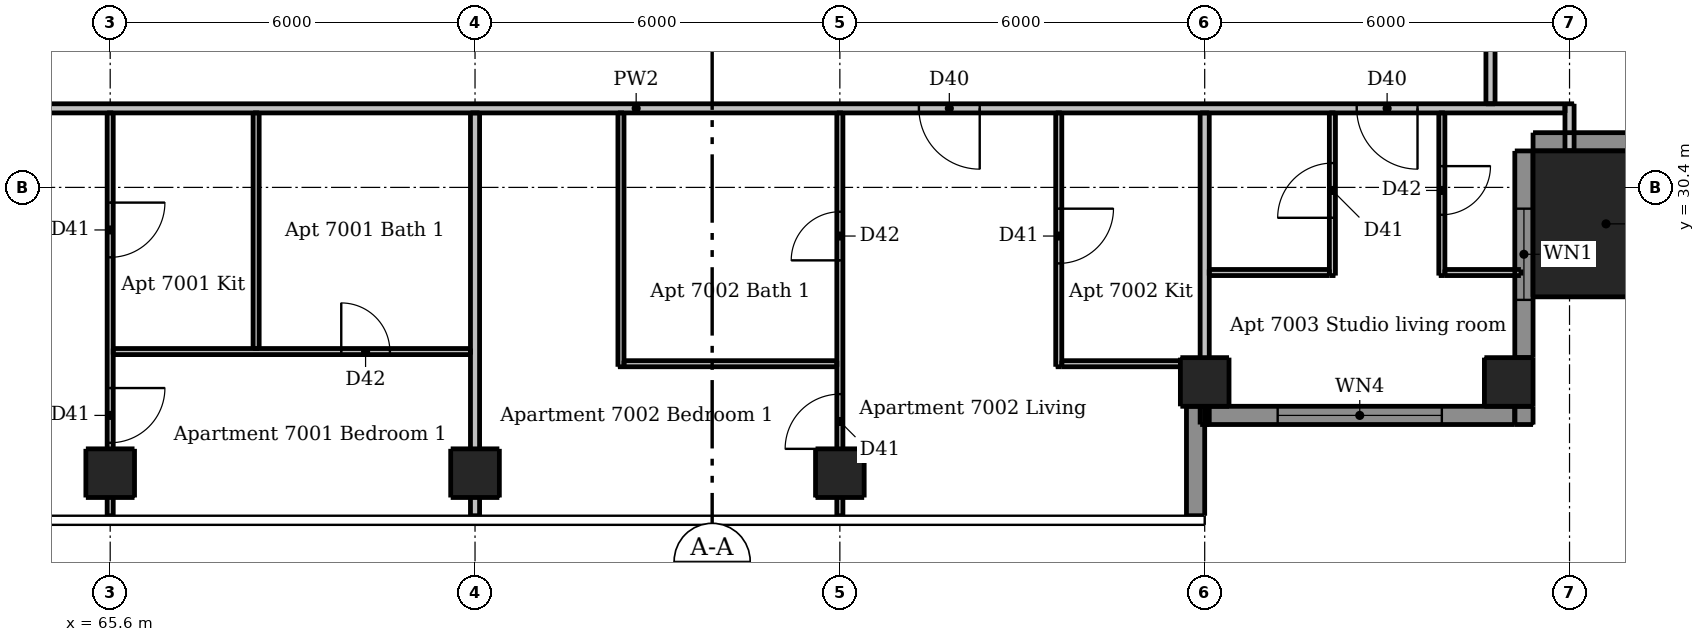
"""IFC4 building model, lengths in metres.
Left out: names, types, materials, properties, quantities, classifications, styles, units other than length and angle.
Written with IfcOpenShell. Run it as: python <this file> out.ifc"""

import sys

from ifc_helpers import new_model, si_unit, direction, frame, frame_2d, origin, origin_2d, place, context, subcontext, project, spatial, rectangle, extrude, element, fill, save


model = new_model("IFC4")
c1 = context("Model", 3, precision=1e-05, world=origin(), true_north=direction((0.0, 1.0)))
c2 = subcontext(c1, "Body", "Model", "MODEL_VIEW")
j1 = project(units=[si_unit("LENGTHUNIT", "METRE"), si_unit("PLANEANGLEUNIT", "RADIAN")], contexts=[c1])
p1 = place(None, origin())
s1 = spatial("IfcSite", under=j1, at=p1, CompositionType="ELEMENT")
p2 = place(p1, origin())
s2 = spatial("IfcBuilding", under=s1, at=p2, CompositionType="ELEMENT")
p3 = place(p2, frame((0.0, 0.0, 262.0)))
s3 = spatial("IfcBuildingStorey", under=s2, at=p3, CompositionType="ELEMENT", Elevation=262.0)
for number, where, z_axis, x_axis in (
    (1, (65.6, 25.7, 0.0), (0.0, 0.0, 1.0), (1.0, 0.0, 0.0)),
    (2, (71.6, 25.7, 0.0), (0.0, 0.0, 1.0), (1.0, 0.0, 0.0)),
    (3, (77.6, 25.7, 0.0), (0.0, 0.0, 1.0), (1.0, 0.0, 0.0)),
    (4, (83.6, 27.2, 0.0), (0.0, 0.0, 1.0), (1.0, 0.0, 0.0)),
    (5, (88.6, 27.2, 0.0), (0.0, 0.0, 1.0), (1.0, 0.0, 0.0)),
):
    element("IfcColumn", number, at=place(p3, frame(where, z_axis=z_axis, x_axis=x_axis)), inside=s3, PredefinedType="COLUMN", context=c2, shape_type="SweptSolid", body=[
        extrude(rectangle(XDim=0.8, YDim=0.8, at=origin_2d()), origin(), (0.0, 0.0, 1.0), 3.05),
    ])
p4 = place(p3, frame((90.2, 29.8, 0.0), z_axis=(0.0, 0.0, 1.0), x_axis=(1.0, 0.0, 0.0)))
e6 = element("IfcColumn", 6, at=p4, inside=s3, PredefinedType="COLUMN", context=c2, shape_type="SweptSolid", body=[
    extrude(rectangle(XDim=2.4, YDim=2.4, at=origin_2d()), origin(), (0.0, 0.0, 1.0), 3.3),
])
p5 = place(p3, frame((83.45, 25.0, 0.0), z_axis=(0.0, 0.0, 1.0), x_axis=(0.0, 1.0, 0.0)))
e7 = element("IfcWall", 7, at=p5, inside=s3, PredefinedType="SOLIDWALL", context=c2, shape_type="SweptSolid", body=[
    extrude(rectangle(XDim=1.8, YDim=0.3, at=frame_2d((0.9, 0.0))), origin(), (0.0, 0.0, 1.0), 3.05),
])
p6 = place(p3, frame((88.85, 26.5, 0.0), z_axis=(0.0, 0.0, 1.0), x_axis=(0.0, 1.0, 0.0)))
e8 = element("IfcWall", 8, at=p6, inside=s3, PredefinedType="SOLIDWALL", context=c2, shape_type="SweptSolid", body=[
    extrude(rectangle(XDim=0.3, YDim=0.3, at=frame_2d((0.15, 0.0))), origin(), (0.0, 0.0, 1.0), 3.05),
])
p7 = place(p3, frame((88.85, 27.6, 0.0), z_axis=(0.0, 0.0, 1.0), x_axis=(0.0, 1.0, 0.0)))
e9 = element("IfcWall", 9, at=p7, inside=s3, PredefinedType="SOLIDWALL", context=c2, shape_type="SweptSolid", body=[
    extrude(rectangle(XDim=3.4, YDim=0.3, at=frame_2d((1.7, 0.0))), origin(), (0.0, 0.0, 1.0), 3.05),
])
p8 = place(p7, frame((0.95, 0.0, 0.9)))
e10 = element("IfcOpeningElement", 10, at=p8, cuts=e9, PredefinedType="OPENING", context=c2, shape_type="SweptSolid", body=[
    extrude(rectangle(XDim=1.5, YDim=1.5, at=frame_2d((0.75, 0.75))), frame((0.0, 0.16, 0.0), z_axis=(0.0, -1.0, 0.0), x_axis=(1.0, 0.0, 0.0)), (0.0, 0.0, 1.0), 0.32),
])
p9 = place(p3, frame((89.0, 31.15, 0.0), z_axis=(0.0, 0.0, 1.0), x_axis=(1.0, 0.0, 0.0)))
e11 = element("IfcWall", 11, at=p9, inside=s3, PredefinedType="SOLIDWALL", context=c2, shape_type="SweptSolid", body=[
    extrude(rectangle(XDim=3.4, YDim=0.3, at=frame_2d((1.7, 0.0))), origin(), (0.0, 0.0, 1.0), 3.05),
])
p10 = place(p3, frame((83.6, 26.65, 0.0), z_axis=(0.0, 0.0, 1.0), x_axis=(1.0, 0.0, 0.0)))
e12 = element("IfcWall", 12, at=p10, inside=s3, PredefinedType="SOLIDWALL", context=c2, shape_type="SweptSolid", body=[
    extrude(rectangle(XDim=5.1, YDim=0.3, at=frame_2d((2.55, 0.0))), origin(), (0.0, 0.0, 1.0), 3.05),
])
p11 = place(p10, frame((1.2, 0.0, 0.15)))
e13 = element("IfcOpeningElement", 13, at=p11, cuts=e12, PredefinedType="OPENING", context=c2, shape_type="SweptSolid", body=[
    extrude(rectangle(XDim=2.7, YDim=2.1, at=frame_2d((1.35, 1.05))), frame((0.0, 0.16, 0.0), z_axis=(0.0, -1.0, 0.0), x_axis=(1.0, 0.0, 0.0)), (0.0, 0.0, 1.0), 0.32),
])
p12 = place(p3, frame((65.6, 31.625, 0.0), z_axis=(0.0, 0.0, 1.0), x_axis=(0.0, -1.0, 0.0)))
e14 = element("IfcWall", 14, at=p12, inside=s3, PredefinedType="PARTITIONING", context=c2, shape_type="SweptSolid", body=[
    extrude(rectangle(XDim=6.625, YDim=0.1, at=frame_2d((3.312, 0.0))), origin(), (0.0, 0.0, 1.0), 2.59),
])
p13 = place(p12, frame((1.475, 0.0, 0.0)))
e15 = element("IfcOpeningElement", 15, at=p13, cuts=e14, PredefinedType="OPENING", context=c2, shape_type="SweptSolid", body=[
    extrude(rectangle(XDim=0.9, YDim=2.1, at=frame_2d((0.45, 1.05))), frame((0.0, 0.06, 0.0), z_axis=(0.0, -1.0, 0.0), x_axis=(1.0, 0.0, 0.0)), (0.0, 0.0, 1.0), 0.12),
])
p14 = place(p12, frame((4.525, 0.0, 0.0)))
e16 = element("IfcOpeningElement", 16, at=p14, cuts=e14, PredefinedType="OPENING", context=c2, shape_type="SweptSolid", body=[
    extrude(rectangle(XDim=0.9, YDim=2.1, at=frame_2d((0.45, 1.05))), frame((0.0, 0.06, 0.0), z_axis=(0.0, -1.0, 0.0), x_axis=(1.0, 0.0, 0.0)), (0.0, 0.0, 1.0), 0.12),
])
p15 = place(p3, frame((68.0, 27.75, 0.0), z_axis=(0.0, 0.0, 1.0), x_axis=(0.0, 1.0, 0.0)))
e17 = element("IfcWall", 17, at=p15, inside=s3, PredefinedType="PARTITIONING", context=c2, shape_type="SweptSolid", body=[
    extrude(rectangle(XDim=3.875, YDim=0.1, at=frame_2d((1.938, 0.0))), origin(), (0.0, 0.0, 1.0), 3.05),
])
p16 = place(p3, frame((74.0, 27.45, 0.0), z_axis=(0.0, 0.0, 1.0), x_axis=(0.0, 1.0, 0.0)))
e18 = element("IfcWall", 18, at=p16, inside=s3, PredefinedType="PARTITIONING", context=c2, shape_type="SweptSolid", body=[
    extrude(rectangle(XDim=4.175, YDim=0.1, at=frame_2d((2.087, 0.0))), origin(), (0.0, 0.0, 1.0), 3.05),
])
p17 = place(p3, frame((77.6, 25.0, 0.0), z_axis=(0.0, 0.0, 1.0), x_axis=(0.0, 1.0, 0.0)))
e19 = element("IfcWall", 19, at=p17, inside=s3, PredefinedType="PARTITIONING", context=c2, shape_type="SweptSolid", body=[
    extrude(rectangle(XDim=6.625, YDim=0.1, at=frame_2d((3.312, 0.0))), origin(), (0.0, 0.0, 1.0), 2.59),
])
p18 = place(p17, frame((1.1, 0.0, 0.0)))
e20 = element("IfcOpeningElement", 20, at=p18, cuts=e19, PredefinedType="OPENING", context=c2, shape_type="SweptSolid", body=[
    extrude(rectangle(XDim=0.9, YDim=2.1, at=frame_2d((0.45, 1.05))), frame((0.0, 0.06, 0.0), z_axis=(0.0, -1.0, 0.0), x_axis=(1.0, 0.0, 0.0)), (0.0, 0.0, 1.0), 0.12),
])
p19 = place(p17, frame((4.2, 0.0, 0.0)))
e21 = element("IfcOpeningElement", 21, at=p19, cuts=e19, PredefinedType="OPENING", context=c2, shape_type="SweptSolid", body=[
    extrude(rectangle(XDim=0.8, YDim=2.1, at=frame_2d((0.4, 1.05))), frame((0.0, 0.06, 0.0), z_axis=(0.0, -1.0, 0.0), x_axis=(1.0, 0.0, 0.0)), (0.0, 0.0, 1.0), 0.12),
])
p20 = place(p3, frame((81.2, 31.625, 0.0), z_axis=(0.0, 0.0, 1.0), x_axis=(0.0, -1.0, 0.0)))
e22 = element("IfcWall", 22, at=p20, inside=s3, PredefinedType="PARTITIONING", context=c2, shape_type="SweptSolid", body=[
    extrude(rectangle(XDim=4.175, YDim=0.1, at=frame_2d((2.087, 0.0))), origin(), (0.0, 0.0, 1.0), 3.05),
])
p21 = place(p20, frame((1.575, 0.0, 0.0)))
e23 = element("IfcOpeningElement", 23, at=p21, cuts=e22, PredefinedType="OPENING", context=c2, shape_type="SweptSolid", body=[
    extrude(rectangle(XDim=0.9, YDim=2.1, at=frame_2d((0.45, 1.05))), frame((0.0, 0.06, 0.0), z_axis=(0.0, -1.0, 0.0), x_axis=(1.0, 0.0, 0.0)), (0.0, 0.0, 1.0), 0.12),
])
p22 = place(p3, frame((85.7, 28.95, 0.0), z_axis=(0.0, 0.0, 1.0), x_axis=(0.0, 1.0, 0.0)))
e24 = element("IfcWall", 24, at=p22, inside=s3, PredefinedType="PARTITIONING", context=c2, shape_type="SweptSolid", body=[
    extrude(rectangle(XDim=2.675, YDim=0.1, at=frame_2d((1.337, 0.0))), origin(), (0.0, 0.0, 1.0), 3.05),
])
p23 = place(p22, frame((0.95, 0.0, 0.0)))
e25 = element("IfcOpeningElement", 25, at=p23, cuts=e24, PredefinedType="OPENING", context=c2, shape_type="SweptSolid", body=[
    extrude(rectangle(XDim=0.9, YDim=2.1, at=frame_2d((0.45, 1.05))), frame((0.0, 0.06, 0.0), z_axis=(0.0, -1.0, 0.0), x_axis=(1.0, 0.0, 0.0)), (0.0, 0.0, 1.0), 0.12),
])
p24 = place(p3, frame((87.5, 31.625, 0.0), z_axis=(0.0, 0.0, 1.0), x_axis=(0.0, -1.0, 0.0)))
e26 = element("IfcWall", 26, at=p24, inside=s3, PredefinedType="PARTITIONING", context=c2, shape_type="SweptSolid", body=[
    extrude(rectangle(XDim=2.675, YDim=0.1, at=frame_2d((1.337, 0.0))), origin(), (0.0, 0.0, 1.0), 3.05),
])
p25 = place(p24, frame((0.875, 0.0, 0.0)))
e27 = element("IfcOpeningElement", 27, at=p25, cuts=e26, PredefinedType="OPENING", context=c2, shape_type="SweptSolid", body=[
    extrude(rectangle(XDim=0.8, YDim=2.1, at=frame_2d((0.4, 1.05))), frame((0.0, 0.06, 0.0), z_axis=(0.0, -1.0, 0.0), x_axis=(1.0, 0.0, 0.0)), (0.0, 0.0, 1.0), 0.12),
])
p26 = place(p3, frame((83.675, 29.0, 0.0), z_axis=(0.0, 0.0, 1.0), x_axis=(1.0, 0.0, 0.0)))
e28 = element("IfcWall", 28, at=p26, inside=s3, PredefinedType="PARTITIONING", context=c2, shape_type="SweptSolid", body=[
    extrude(rectangle(XDim=1.975, YDim=0.1, at=frame_2d((0.987, 0.0))), origin(), (0.0, 0.0, 1.0), 3.05),
])
p27 = place(p3, frame((87.55, 29.0, 0.0), z_axis=(0.0, 0.0, 1.0), x_axis=(1.0, 0.0, 0.0)))
e29 = element("IfcWall", 29, at=p27, inside=s3, PredefinedType="PARTITIONING", context=c2, shape_type="SweptSolid", body=[
    extrude(rectangle(XDim=1.25, YDim=0.1, at=frame_2d((0.625, 0.0))), origin(), (0.0, 0.0, 1.0), 3.05),
])
p28 = place(p3, frame((65.65, 27.7, 0.0), z_axis=(0.0, 0.0, 1.0), x_axis=(1.0, 0.0, 0.0)))
e30 = element("IfcWall", 30, at=p28, inside=s3, PredefinedType="PARTITIONING", context=c2, shape_type="SweptSolid", body=[
    extrude(rectangle(XDim=5.875, YDim=0.1, at=frame_2d((2.938, 0.0))), origin(), (0.0, 0.0, 1.0), 3.05),
])
p29 = place(p28, frame((3.75, 0.0, 0.0)))
e31 = element("IfcOpeningElement", 31, at=p29, cuts=e30, PredefinedType="OPENING", context=c2, shape_type="SweptSolid", body=[
    extrude(rectangle(XDim=0.8, YDim=2.1, at=frame_2d((0.4, 1.05))), frame((0.0, 0.06, 0.0), z_axis=(0.0, -1.0, 0.0), x_axis=(1.0, 0.0, 0.0)), (0.0, 0.0, 1.0), 0.12),
])
p30 = place(p3, frame((74.05, 27.5, 0.0), z_axis=(0.0, 0.0, 1.0), x_axis=(1.0, 0.0, 0.0)))
e32 = element("IfcWall", 32, at=p30, inside=s3, PredefinedType="PARTITIONING", context=c2, shape_type="SweptSolid", body=[
    extrude(rectangle(XDim=3.5, YDim=0.1, at=frame_2d((1.75, 0.0))), origin(), (0.0, 0.0, 1.0), 3.05),
])
p31 = place(p3, frame((81.25, 27.5, 0.0), z_axis=(0.0, 0.0, 1.0), x_axis=(1.0, 0.0, 0.0)))
e33 = element("IfcWall", 33, at=p31, inside=s3, PredefinedType="PARTITIONING", context=c2, shape_type="SweptSolid", body=[
    extrude(rectangle(XDim=2.275, YDim=0.1, at=frame_2d((1.137, 0.0))), origin(), (0.0, 0.0, 1.0), 3.05),
])
p32 = place(p3, frame((71.6, 25.0, 0.0), z_axis=(0.0, 0.0, 1.0), x_axis=(0.0, 1.0, 0.0)))
e34 = element("IfcWall", 34, at=p32, inside=s3, PredefinedType="PARTITIONING", context=c2, shape_type="SweptSolid", body=[
    extrude(rectangle(XDim=6.625, YDim=0.15, at=frame_2d((3.312, 0.0))), origin(), (0.0, 0.0, 1.0), 2.59),
])
p33 = place(p3, frame((83.6, 26.5, 0.0), z_axis=(0.0, 0.0, 1.0), x_axis=(0.0, 1.0, 0.0)))
e35 = element("IfcWall", 35, at=p33, inside=s3, PredefinedType="PARTITIONING", context=c2, shape_type="SweptSolid", body=[
    extrude(rectangle(XDim=5.125, YDim=0.15, at=frame_2d((2.562, 0.0))), origin(), (0.0, 0.0, 1.0), 2.647),
])
p34 = place(p3, frame((88.3, 61.175, 0.0), z_axis=(0.0, 0.0, 1.0), x_axis=(0.0, -1.0, 0.0)))
e36 = element("IfcWall", 36, at=p34, inside=s3, PredefinedType="PARTITIONING", context=c2, shape_type="SweptSolid", body=[
    extrude(rectangle(XDim=29.4, YDim=0.15, at=frame_2d((14.7, 0.0))), origin(), (0.0, 0.0, 1.0), 3.05),
])
p35 = place(p34, frame((26.625, 0.0, 0.0)))
e37 = element("IfcOpeningElement", 37, at=p35, cuts=e36, PredefinedType="OPENING", context=c2, shape_type="SweptSolid", body=[
    extrude(rectangle(XDim=1.0, YDim=2.1, at=frame_2d((0.5, 1.05))), frame((0.0, 0.085, 0.0), z_axis=(0.0, -1.0, 0.0), x_axis=(1.0, 0.0, 0.0)), (0.0, 0.0, 1.0), 0.17),
])
p36 = place(p34, frame((9.275, 0.0, 0.0)))
e38 = element("IfcOpeningElement", 38, at=p36, cuts=e36, PredefinedType="OPENING", context=c2, shape_type="SweptSolid", body=[
    extrude(rectangle(XDim=1.0, YDim=2.1, at=frame_2d((0.5, 1.05))), frame((0.0, 0.085, 0.0), z_axis=(0.0, -1.0, 0.0), x_axis=(1.0, 0.0, 0.0)), (0.0, 0.0, 1.0), 0.17),
])
p37 = place(p3, frame((89.6, 31.0, 0.0), z_axis=(0.0, 0.0, 1.0), x_axis=(0.0, 1.0, 0.0)))
e39 = element("IfcWall", 39, at=p37, inside=s3, PredefinedType="PARTITIONING", context=c2, shape_type="SweptSolid", body=[
    extrude(rectangle(XDim=0.775, YDim=0.15, at=frame_2d((0.387, 0.0))), origin(), (0.0, 0.0, 1.0), 3.05),
])
p38 = place(p3, frame((89.525, 31.7, 0.0), z_axis=(0.0, 0.0, 1.0), x_axis=(-1.0, 0.0, 0.0)))
e40 = element("IfcWall", 40, at=p38, inside=s3, PredefinedType="PARTITIONING", context=c2, shape_type="SweptSolid", body=[
    extrude(rectangle(XDim=30.55, YDim=0.15, at=frame_2d((15.275, 0.0))), origin(), (0.0, 0.0, 1.0), 3.05),
])
p39 = place(p38, frame((26.775, 0.0, 0.0)))
e41 = element("IfcOpeningElement", 41, at=p39, cuts=e40, PredefinedType="OPENING", context=c2, shape_type="SweptSolid", body=[
    extrude(rectangle(XDim=1.0, YDim=2.1, at=frame_2d((0.5, 1.05))), frame((0.0, 0.085, 0.0), z_axis=(0.0, -1.0, 0.0), x_axis=(1.0, 0.0, 0.0)), (0.0, 0.0, 1.0), 0.17),
])
p40 = place(p38, frame((9.625, 0.0, 0.0)))
e42 = element("IfcOpeningElement", 42, at=p40, cuts=e40, PredefinedType="OPENING", context=c2, shape_type="SweptSolid", body=[
    extrude(rectangle(XDim=1.0, YDim=2.1, at=frame_2d((0.5, 1.05))), frame((0.0, 0.085, 0.0), z_axis=(0.0, -1.0, 0.0), x_axis=(1.0, 0.0, 0.0)), (0.0, 0.0, 1.0), 0.17),
])
p41 = place(p38, frame((2.425, 0.0, 0.0)))
e43 = element("IfcOpeningElement", 43, at=p41, cuts=e40, PredefinedType="OPENING", context=c2, shape_type="SweptSolid", body=[
    extrude(rectangle(XDim=1.0, YDim=2.1, at=frame_2d((0.5, 1.05))), frame((0.0, 0.085, 0.0), z_axis=(0.0, -1.0, 0.0), x_axis=(1.0, 0.0, 0.0)), (0.0, 0.0, 1.0), 0.17),
])
p42 = place(p8, origin())
e44 = element("IfcWindow", 44, at=p42, inside=s3, PartitioningType="DOUBLE_PANEL_VERTICAL", PredefinedType="WINDOW", context=c2, shape_type="SweptSolid", body=[
    extrude(rectangle(XDim=1.5, YDim=1.5, at=frame_2d((0.75, 0.75))), frame((0.0, 0.03, 0.0), z_axis=(0.0, -1.0, 0.0), x_axis=(1.0, 0.0, 0.0)), (0.0, 0.0, 1.0), 0.06),
])
fill(e10, e44)
p43 = place(p11, origin())
e45 = element("IfcWindow", 45, at=p43, inside=s3, PartitioningType="DOUBLE_PANEL_VERTICAL", PredefinedType="WINDOW", context=c2, shape_type="SweptSolid", body=[
    extrude(rectangle(XDim=2.7, YDim=2.1, at=frame_2d((1.35, 1.05))), frame((0.0, 0.03, 0.0), z_axis=(0.0, -1.0, 0.0), x_axis=(1.0, 0.0, 0.0)), (0.0, 0.0, 1.0), 0.06),
])
fill(e13, e45)
p44 = place(p13, origin())
e46 = element("IfcDoor", 46, at=p44, inside=s3, OperationType="SINGLE_SWING_LEFT", PredefinedType="DOOR", context=c2, shape_type="SweptSolid", body=[
    extrude(rectangle(XDim=0.9, YDim=2.1, at=frame_2d((0.45, 1.05))), frame((0.0, 0.025, 0.0), z_axis=(0.0, -1.0, 0.0), x_axis=(1.0, 0.0, 0.0)), (0.0, 0.0, 1.0), 0.05),
])
fill(e15, e46)
p45 = place(p14, origin())
e47 = element("IfcDoor", 47, at=p45, inside=s3, OperationType="SINGLE_SWING_LEFT", PredefinedType="DOOR", context=c2, shape_type="SweptSolid", body=[
    extrude(rectangle(XDim=0.9, YDim=2.1, at=frame_2d((0.45, 1.05))), frame((0.0, 0.025, 0.0), z_axis=(0.0, -1.0, 0.0), x_axis=(1.0, 0.0, 0.0)), (0.0, 0.0, 1.0), 0.05),
])
fill(e16, e47)
p46 = place(p29, origin())
e48 = element("IfcDoor", 48, at=p46, inside=s3, OperationType="SINGLE_SWING_LEFT", PredefinedType="DOOR", context=c2, shape_type="SweptSolid", body=[
    extrude(rectangle(XDim=0.8, YDim=2.1, at=frame_2d((0.4, 1.05))), frame((0.0, 0.025, 0.0), z_axis=(0.0, -1.0, 0.0), x_axis=(1.0, 0.0, 0.0)), (0.0, 0.0, 1.0), 0.05),
])
fill(e31, e48)
p47 = place(p40, origin())
e49 = element("IfcDoor", 49, at=p47, inside=s3, OperationType="SINGLE_SWING_LEFT", PredefinedType="DOOR", context=c2, shape_type="SweptSolid", body=[
    extrude(rectangle(XDim=1.0, YDim=2.1, at=frame_2d((0.5, 1.05))), frame((0.0, 0.025, 0.0), z_axis=(0.0, -1.0, 0.0), x_axis=(1.0, 0.0, 0.0)), (0.0, 0.0, 1.0), 0.05),
])
fill(e42, e49)
p48 = place(p21, origin())
e50 = element("IfcDoor", 50, at=p48, inside=s3, OperationType="SINGLE_SWING_LEFT", PredefinedType="DOOR", context=c2, shape_type="SweptSolid", body=[
    extrude(rectangle(XDim=0.9, YDim=2.1, at=frame_2d((0.45, 1.05))), frame((0.0, 0.025, 0.0), z_axis=(0.0, -1.0, 0.0), x_axis=(1.0, 0.0, 0.0)), (0.0, 0.0, 1.0), 0.05),
])
fill(e23, e50)
p49 = place(p18, origin())
e51 = element("IfcDoor", 51, at=p49, inside=s3, OperationType="SINGLE_SWING_LEFT", PredefinedType="DOOR", context=c2, shape_type="SweptSolid", body=[
    extrude(rectangle(XDim=0.9, YDim=2.1, at=frame_2d((0.45, 1.05))), frame((0.0, 0.025, 0.0), z_axis=(0.0, -1.0, 0.0), x_axis=(1.0, 0.0, 0.0)), (0.0, 0.0, 1.0), 0.05),
])
fill(e20, e51)
p50 = place(p19, origin())
e52 = element("IfcDoor", 52, at=p50, inside=s3, OperationType="SINGLE_SWING_LEFT", PredefinedType="DOOR", context=c2, shape_type="SweptSolid", body=[
    extrude(rectangle(XDim=0.8, YDim=2.1, at=frame_2d((0.4, 1.05))), frame((0.0, 0.025, 0.0), z_axis=(0.0, -1.0, 0.0), x_axis=(1.0, 0.0, 0.0)), (0.0, 0.0, 1.0), 0.05),
])
fill(e21, e52)
p51 = place(p41, origin())
e53 = element("IfcDoor", 53, at=p51, inside=s3, OperationType="SINGLE_SWING_LEFT", PredefinedType="DOOR", context=c2, shape_type="SweptSolid", body=[
    extrude(rectangle(XDim=1.0, YDim=2.1, at=frame_2d((0.5, 1.05))), frame((0.0, 0.025, 0.0), z_axis=(0.0, -1.0, 0.0), x_axis=(1.0, 0.0, 0.0)), (0.0, 0.0, 1.0), 0.05),
])
fill(e43, e53)
p52 = place(p23, origin())
e54 = element("IfcDoor", 54, at=p52, inside=s3, OperationType="SINGLE_SWING_LEFT", PredefinedType="DOOR", context=c2, shape_type="SweptSolid", body=[
    extrude(rectangle(XDim=0.9, YDim=2.1, at=frame_2d((0.45, 1.05))), frame((0.0, 0.025, 0.0), z_axis=(0.0, -1.0, 0.0), x_axis=(1.0, 0.0, 0.0)), (0.0, 0.0, 1.0), 0.05),
])
fill(e25, e54)
p53 = place(p25, origin())
e55 = element("IfcDoor", 55, at=p53, inside=s3, OperationType="SINGLE_SWING_LEFT", PredefinedType="DOOR", context=c2, shape_type="SweptSolid", body=[
    extrude(rectangle(XDim=0.8, YDim=2.1, at=frame_2d((0.4, 1.05))), frame((0.0, 0.025, 0.0), z_axis=(0.0, -1.0, 0.0), x_axis=(1.0, 0.0, 0.0)), (0.0, 0.0, 1.0), 0.05),
])
fill(e27, e55)
save(model, sys.argv[1])
